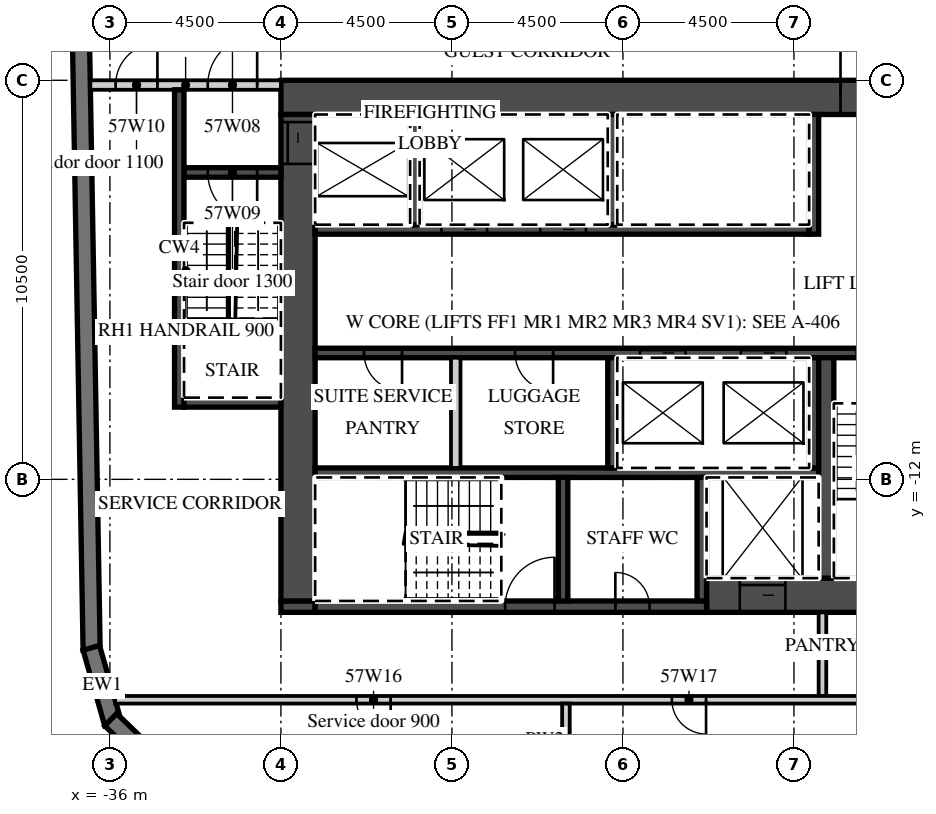
"""IFC4 building model, lengths in metres.
Left out: names, types, materials, properties, quantities, classifications, styles, units other than length and angle.
Written with IfcOpenShell. Run it as: python <this file> out.ifc"""

import sys

from ifc_helpers import new_model, si_unit, direction, frame, frame_2d, origin, place, context, subcontext, project, spatial, polyline, rectangle, outline, extrude, element, fill, save


model = new_model("IFC4")
c1 = context("Model", 3, precision=1e-05, world=origin(), true_north=direction((0.0, 1.0)))
c2 = subcontext(c1, "Body", "Model", "MODEL_VIEW")
j1 = project(units=[si_unit("LENGTHUNIT", "METRE"), si_unit("PLANEANGLEUNIT", "RADIAN")], contexts=[c1])
p1 = place(None, origin())
s1 = spatial("IfcSite", under=j1, at=p1, CompositionType="ELEMENT")
p2 = place(p1, origin())
s2 = spatial("IfcBuilding", under=s1, at=p2, CompositionType="ELEMENT")
p3 = place(p2, frame((0.0, 0.0, 234.2)))
s3 = spatial("IfcBuildingStorey", under=s2, at=p3, CompositionType="ELEMENT", Elevation=234.2)
p4 = place(p3, frame((-37.057, 16.503, 0.0), z_axis=(0.0, 0.0, 1.0), x_axis=(0.017452279857, -0.999847697366, 0.0)))
e1 = element("IfcWall", 1, at=p4, inside=s3, PredefinedType="SOLIDWALL", context=c2, shape_type="SweptSolid", body=[
    extrude(rectangle(XDim=33.0, YDim=0.45, at=frame_2d((16.5, 0.0))), origin(), (0.0, 0.0, 1.0), 3.02),
])
p5 = place(p3, frame((-36.49, -16.434, 0.0), z_axis=(0.0, 0.0, 1.0), x_axis=(0.275577603096, -0.961278827745, 0.0)))
e2 = element("IfcWall", 2, at=p5, inside=s3, PredefinedType="SOLIDWALL", context=c2, shape_type="SweptSolid", body=[
    extrude(outline(polyline([(0.0, -0.225), (2.071, -0.225), (1.95, 0.225), (0.121, 0.225), (0.0, -0.225)])), origin(), (0.0, 0.0, 1.0), 3.02),
])
p6 = place(p3, frame((-35.979, -18.324, 0.0), z_axis=(0.0, 0.0, 1.0), x_axis=(0.719320193998, -0.694678672846, 0.0)))
e3 = element("IfcWall", 3, at=p6, inside=s3, PredefinedType="SOLIDWALL", context=c2, shape_type="SweptSolid", body=[
    extrude(outline(polyline([(0.0, -0.225), (2.071, -0.225), (1.95, 0.225), (0.121, 0.225), (0.0, -0.225)])), origin(), (0.0, 0.0, 1.0), 3.02),
])
p7 = place(p3, frame((-31.5, -1.95, 0.0), z_axis=(0.0, 0.0, 1.0), x_axis=(1.0, 0.0, 0.0)))
e4 = element("IfcWall", 4, at=p7, inside=s3, PredefinedType="SHEAR", context=c2, shape_type="SweptSolid", body=[
    extrude(rectangle(XDim=18.0, YDim=0.9, at=frame_2d((9.0, 0.0))), origin(), (0.0, 0.0, 1.0), 3.02),
])
p8 = place(p7, frame((14.725, 0.0, 0.0)))
e5 = element("IfcOpeningElement", 5, at=p8, cuts=e4, PredefinedType="OPENING", context=c2, shape_type="SweptSolid", body=[
    extrude(rectangle(XDim=1.8, YDim=2.1, at=frame_2d((0.9, 1.05))), frame((0.0, 0.46, 0.0), z_axis=(0.0, -1.0, 0.0), x_axis=(1.0, 0.0, 0.0)), (0.0, 0.0, 1.0), 0.92),
])
p9 = place(p3, frame((-20.3, -15.05, 0.0), z_axis=(0.0, 0.0, 1.0), x_axis=(1.0, 0.0, 0.0)))
e6 = element("IfcWall", 6, at=p9, inside=s3, PredefinedType="SHEAR", context=c2, shape_type="SweptSolid", body=[
    extrude(rectangle(XDim=6.8, YDim=0.9, at=frame_2d((3.4, 0.0))), origin(), (0.0, 0.0, 1.0), 3.02),
])
p10 = place(p9, frame((0.875, 0.0, 0.0)))
e7 = element("IfcOpeningElement", 7, at=p10, cuts=e6, PredefinedType="OPENING", context=c2, shape_type="SweptSolid", body=[
    extrude(rectangle(XDim=1.2, YDim=2.1, at=frame_2d((0.6, 1.05))), frame((0.0, 0.46, 0.0), z_axis=(0.0, -1.0, 0.0), x_axis=(1.0, 0.0, 0.0)), (0.0, 0.0, 1.0), 0.92),
])
p11 = place(p3, frame((-31.5, -15.35, 0.0), z_axis=(0.0, 0.0, 1.0), x_axis=(1.0, 0.0, 0.0)))
e8 = element("IfcWall", 8, at=p11, inside=s3, PredefinedType="SHEAR", context=c2, shape_type="SweptSolid", body=[
    extrude(rectangle(XDim=0.9, YDim=0.3, at=frame_2d((0.45, 0.0))), origin(), (0.0, 0.0, 1.0), 3.02),
])
p12 = place(p3, frame((-30.6, -15.35, 0.0), z_axis=(0.0, 0.0, 1.0), x_axis=(1.0, 0.0, 0.0)))
e9 = element("IfcWall", 9, at=p12, inside=s3, PredefinedType="SHEAR", context=c2, shape_type="SweptSolid", body=[
    extrude(rectangle(XDim=10.3, YDim=0.3, at=frame_2d((5.15, 0.0))), origin(), (0.0, 0.0, 1.0), 3.02),
])
p13 = place(p12, frame((5.0, 0.0, 0.0)))
e10 = element("IfcOpeningElement", 10, at=p13, cuts=e9, PredefinedType="OPENING", context=c2, shape_type="SweptSolid", body=[
    extrude(rectangle(XDim=1.3, YDim=2.1, at=frame_2d((0.65, 1.05))), frame((0.0, 0.16, 0.0), z_axis=(0.0, -1.0, 0.0), x_axis=(1.0, 0.0, 0.0)), (0.0, 0.0, 1.0), 0.32),
])
p14 = place(p12, frame((7.9, 0.0, 0.0)))
e11 = element("IfcOpeningElement", 11, at=p14, cuts=e9, PredefinedType="OPENING", context=c2, shape_type="SweptSolid", body=[
    extrude(rectangle(XDim=0.9, YDim=2.1, at=frame_2d((0.45, 1.05))), frame((0.0, 0.16, 0.0), z_axis=(0.0, -1.0, 0.0), x_axis=(1.0, 0.0, 0.0)), (0.0, 0.0, 1.0), 0.32),
])
p15 = place(p3, frame((-31.05, -15.2, 0.0), z_axis=(0.0, 0.0, 1.0), x_axis=(0.0, 1.0, 0.0)))
e12 = element("IfcWall", 12, at=p15, inside=s3, PredefinedType="SHEAR", context=c2, shape_type="SweptSolid", body=[
    extrude(rectangle(XDim=12.8, YDim=0.9, at=frame_2d((6.4, 0.0))), origin(), (0.0, 0.0, 1.0), 3.02),
])
p16 = place(p15, frame((11.5, 0.0, 0.0)))
e13 = element("IfcOpeningElement", 13, at=p16, cuts=e12, PredefinedType="OPENING", context=c2, shape_type="SweptSolid", body=[
    extrude(rectangle(XDim=1.1, YDim=2.1, at=frame_2d((0.55, 1.05))), frame((0.0, 0.46, 0.0), z_axis=(0.0, -1.0, 0.0), x_axis=(1.0, 0.0, 0.0)), (0.0, 0.0, 1.0), 0.92),
])
p17 = place(p3, frame((-30.6, -5.425, 0.0), z_axis=(0.0, 0.0, 1.0), x_axis=(1.0, 0.0, 0.0)))
e14 = element("IfcWall", 14, at=p17, inside=s3, PredefinedType="SHEAR", context=c2, shape_type="SweptSolid", body=[
    extrude(rectangle(XDim=13.0, YDim=0.25, at=frame_2d((6.5, 0.0))), origin(), (0.0, 0.0, 1.0), 3.02),
])
p18 = place(p17, frame((3.325, 0.0, 0.0)))
e15 = element("IfcOpeningElement", 15, at=p18, cuts=e14, PredefinedType="OPENING", context=c2, shape_type="SweptSolid", body=[
    extrude(rectangle(XDim=1.2, YDim=2.1, at=frame_2d((0.6, 1.05))), frame((0.0, 0.135, 0.0), z_axis=(0.0, -1.0, 0.0), x_axis=(1.0, 0.0, 0.0)), (0.0, 0.0, 1.0), 0.27),
])
p19 = place(p17, frame((5.925, 0.0, 0.0)))
e16 = element("IfcOpeningElement", 16, at=p19, cuts=e14, PredefinedType="OPENING", context=c2, shape_type="SweptSolid", body=[
    extrude(rectangle(XDim=1.2, YDim=2.1, at=frame_2d((0.6, 1.05))), frame((0.0, 0.135, 0.0), z_axis=(0.0, -1.0, 0.0), x_axis=(1.0, 0.0, 0.0)), (0.0, 0.0, 1.0), 0.27),
])
p20 = place(p3, frame((-17.475, -5.55, 0.0), z_axis=(0.0, 0.0, 1.0), x_axis=(0.0, 1.0, 0.0)))
e17 = element("IfcWall", 17, at=p20, inside=s3, PredefinedType="SHEAR", context=c2, shape_type="SweptSolid", body=[
    extrude(rectangle(XDim=3.15, YDim=0.25, at=frame_2d((1.575, 0.0))), origin(), (0.0, 0.0, 1.0), 3.02),
])
for number, where, z_axis, x_axis in (
    (18, (-27.975, -5.3, 0.0), (0.0, 0.0, 1.0), (0.0, 1.0, 0.0)),
    (19, (-22.775, -5.3, 0.0), (0.0, 0.0, 1.0), (0.0, 1.0, 0.0)),
):
    element("IfcWall", number, at=place(p3, frame(where, z_axis=z_axis, x_axis=x_axis)), inside=s3, PredefinedType="SHEAR", context=c2, shape_type="SweptSolid", body=[
        extrude(rectangle(XDim=2.9, YDim=0.25, at=frame_2d((1.45, 0.0))), origin(), (0.0, 0.0, 1.0), 3.02),
    ])
p21 = place(p3, frame((-30.6, -8.675, 0.0), z_axis=(0.0, 0.0, 1.0), x_axis=(1.0, 0.0, 0.0)))
e20 = element("IfcWall", 20, at=p21, inside=s3, PredefinedType="SHEAR", context=c2, shape_type="SweptSolid", body=[
    extrude(rectangle(XDim=16.2, YDim=0.25, at=frame_2d((8.1, 0.0))), origin(), (0.0, 0.0, 1.0), 3.02),
])
p22 = place(p21, frame((8.55, 0.0, 0.0)))
e21 = element("IfcOpeningElement", 21, at=p22, cuts=e20, PredefinedType="OPENING", context=c2, shape_type="SweptSolid", body=[
    extrude(rectangle(XDim=1.2, YDim=2.1, at=frame_2d((0.6, 1.05))), frame((0.0, 0.135, 0.0), z_axis=(0.0, -1.0, 0.0), x_axis=(1.0, 0.0, 0.0)), (0.0, 0.0, 1.0), 0.27),
])
p23 = place(p21, frame((11.2, 0.0, 0.0)))
e22 = element("IfcOpeningElement", 22, at=p23, cuts=e20, PredefinedType="OPENING", context=c2, shape_type="SweptSolid", body=[
    extrude(rectangle(XDim=1.2, YDim=2.1, at=frame_2d((0.6, 1.05))), frame((0.0, 0.135, 0.0), z_axis=(0.0, -1.0, 0.0), x_axis=(1.0, 0.0, 0.0)), (0.0, 0.0, 1.0), 0.27),
])
p24 = place(p21, frame((14.25, 0.0, 0.0)))
e23 = element("IfcOpeningElement", 23, at=p24, cuts=e20, PredefinedType="OPENING", context=c2, shape_type="SweptSolid", body=[
    extrude(rectangle(XDim=1.3, YDim=2.1, at=frame_2d((0.65, 1.05))), frame((0.0, 0.135, 0.0), z_axis=(0.0, -1.0, 0.0), x_axis=(1.0, 0.0, 0.0)), (0.0, 0.0, 1.0), 0.27),
])
p25 = place(p21, frame((1.288, 0.0, 0.0)))
e24 = element("IfcOpeningElement", 24, at=p25, cuts=e20, PredefinedType="OPENING", context=c2, shape_type="SweptSolid", body=[
    extrude(rectangle(XDim=1.0, YDim=2.1, at=frame_2d((0.5, 1.05))), frame((0.0, 0.135, 0.0), z_axis=(0.0, -1.0, 0.0), x_axis=(1.0, 0.0, 0.0)), (0.0, 0.0, 1.0), 0.27),
])
p26 = place(p21, frame((5.262, 0.0, 0.0)))
e25 = element("IfcOpeningElement", 25, at=p26, cuts=e20, PredefinedType="OPENING", context=c2, shape_type="SweptSolid", body=[
    extrude(rectangle(XDim=1.0, YDim=2.1, at=frame_2d((0.5, 1.05))), frame((0.0, 0.135, 0.0), z_axis=(0.0, -1.0, 0.0), x_axis=(1.0, 0.0, 0.0)), (0.0, 0.0, 1.0), 0.27),
])
p27 = place(p3, frame((-30.6, -11.825, 0.0), z_axis=(0.0, 0.0, 1.0), x_axis=(1.0, 0.0, 0.0)))
e26 = element("IfcWall", 26, at=p27, inside=s3, PredefinedType="SHEAR", context=c2, shape_type="SweptSolid", body=[
    extrude(rectangle(XDim=13.25, YDim=0.25, at=frame_2d((6.625, 0.0))), origin(), (0.0, 0.0, 1.0), 3.02),
])
for number, where, z_axis, x_axis in (
    (27, (-17.475, -11.7, 0.0), (0.0, 0.0, 1.0), (0.0, 1.0, 0.0)),
    (28, (-22.775, -11.7, 0.0), (0.0, 0.0, 1.0), (0.0, 1.0, 0.0)),
):
    element("IfcWall", number, at=place(p3, frame(where, z_axis=z_axis, x_axis=x_axis)), inside=s3, PredefinedType="SHEAR", context=c2, shape_type="SweptSolid", body=[
        extrude(rectangle(XDim=2.9, YDim=0.25, at=frame_2d((1.45, 0.0))), origin(), (0.0, 0.0, 1.0), 3.02),
    ])
p28 = place(p3, frame((-26.9, -11.7, 0.0), z_axis=(0.0, 0.0, 1.0), x_axis=(0.0, 1.0, 0.0)))
e29 = element("IfcWall", 29, at=p28, inside=s3, PredefinedType="PARTITIONING", context=c2, shape_type="SweptSolid", body=[
    extrude(rectangle(XDim=2.9, YDim=0.25, at=frame_2d((1.45, 0.0))), origin(), (0.0, 0.0, 1.0), 3.02),
])
p29 = place(p3, frame((-17.15, -14.6, 0.0), z_axis=(0.0, 0.0, 1.0), x_axis=(0.0, 1.0, 0.0)))
e30 = element("IfcWall", 30, at=p29, inside=s3, PredefinedType="SHEAR", context=c2, shape_type="SweptSolid", body=[
    extrude(rectangle(XDim=5.8, YDim=0.4, at=frame_2d((2.9, 0.0))), origin(), (0.0, 0.0, 1.0), 3.02),
])
for number, where, z_axis, x_axis in (
    (31, (-20.425, -15.2, 0.0), (0.0, 0.0, 1.0), (0.0, 1.0, 0.0)),
    (32, (-24.075, -15.2, 0.0), (0.0, 0.0, 1.0), (0.0, 1.0, 0.0)),
):
    element("IfcWall", number, at=place(p3, frame(where, z_axis=z_axis, x_axis=x_axis)), inside=s3, PredefinedType="SHEAR", context=c2, shape_type="SweptSolid", body=[
        extrude(rectangle(XDim=3.25, YDim=0.25, at=frame_2d((1.625, 0.0))), origin(), (0.0, 0.0, 1.0), 3.02),
    ])
p30 = place(p3, frame((-36.515, -1.625, 0.0), z_axis=(0.0, 0.0, 1.0), x_axis=(1.0, 0.0, 0.0)))
e33 = element("IfcWall", 33, at=p30, inside=s3, PredefinedType="PARTITIONING", context=c2, shape_type="SweptSolid", body=[
    extrude(rectangle(XDim=5.015, YDim=0.25, at=frame_2d((2.508, 0.0))), origin(), (0.0, 0.0, 1.0), 3.02),
])
p31 = place(p30, frame((3.09, 0.0, 0.0)))
e34 = element("IfcOpeningElement", 34, at=p31, cuts=e33, PredefinedType="OPENING", context=c2, shape_type="SweptSolid", body=[
    extrude(rectangle(XDim=1.3, YDim=2.1, at=frame_2d((0.65, 1.05))), frame((0.0, 0.135, 0.0), z_axis=(0.0, -1.0, 0.0), x_axis=(1.0, 0.0, 0.0)), (0.0, 0.0, 1.0), 0.27),
])
p32 = place(p30, frame((0.665, 0.0, 0.0)))
e35 = element("IfcOpeningElement", 35, at=p32, cuts=e33, PredefinedType="OPENING", context=c2, shape_type="SweptSolid", body=[
    extrude(rectangle(XDim=1.1, YDim=2.1, at=frame_2d((0.55, 1.05))), frame((0.0, 0.135, 0.0), z_axis=(0.0, -1.0, 0.0), x_axis=(1.0, 0.0, 0.0)), (0.0, 0.0, 1.0), 0.27),
])
p33 = place(p3, frame((-34.05, -3.925, 0.0), z_axis=(0.0, 0.0, 1.0), x_axis=(1.0, 0.0, 0.0)))
e36 = element("IfcWall", 36, at=p33, inside=s3, PredefinedType="SHEAR", context=c2, shape_type="SweptSolid", body=[
    extrude(rectangle(XDim=2.55, YDim=0.25, at=frame_2d((1.275, 0.0))), origin(), (0.0, 0.0, 1.0), 3.02),
])
p34 = place(p33, frame((0.625, 0.0, 0.0)))
e37 = element("IfcOpeningElement", 37, at=p34, cuts=e36, PredefinedType="OPENING", context=c2, shape_type="SweptSolid", body=[
    extrude(rectangle(XDim=1.3, YDim=2.1, at=frame_2d((0.65, 1.05))), frame((0.0, 0.135, 0.0), z_axis=(0.0, -1.0, 0.0), x_axis=(1.0, 0.0, 0.0)), (0.0, 0.0, 1.0), 0.27),
])
p35 = place(p3, frame((-34.175, -10.1, 0.0), z_axis=(0.0, 0.0, 1.0), x_axis=(0.0, 1.0, 0.0)))
e38 = element("IfcWall", 38, at=p35, inside=s3, PredefinedType="SHEAR", context=c2, shape_type="SweptSolid", body=[
    extrude(rectangle(XDim=8.35, YDim=0.25, at=frame_2d((4.175, 0.0))), origin(), (0.0, 0.0, 1.0), 3.02),
])
p36 = place(p3, frame((-34.05, -9.975, 0.0), z_axis=(0.0, 0.0, 1.0), x_axis=(1.0, 0.0, 0.0)))
e39 = element("IfcWall", 39, at=p36, inside=s3, PredefinedType="SHEAR", context=c2, shape_type="SweptSolid", body=[
    extrude(rectangle(XDim=2.55, YDim=0.25, at=frame_2d((1.275, 0.0))), origin(), (0.0, 0.0, 1.0), 3.02),
])
p37 = place(p3, frame((-17.25, -17.7, 0.0), z_axis=(0.0, 0.0, 1.0), x_axis=(0.0, 1.0, 0.0)))
e40 = element("IfcWall", 40, at=p37, inside=s3, PredefinedType="PARTITIONING", context=c2, shape_type="SweptSolid", body=[
    extrude(rectangle(XDim=2.2, YDim=0.2, at=frame_2d((1.1, 0.0))), origin(), (0.0, 0.0, 1.0), 3.02),
])
p38 = place(p3, frame((-35.864, -17.8, 0.0), z_axis=(0.0, 0.0, 1.0), x_axis=(1.0, 0.0, 0.0)))
e41 = element("IfcWall", 41, at=p38, inside=s3, PredefinedType="PARTITIONING", context=c2, shape_type="SweptSolid", body=[
    extrude(rectangle(XDim=22.264, YDim=0.2, at=frame_2d((11.132, 0.0))), origin(), (0.0, 0.0, 1.0), 3.02),
])
p39 = place(p38, frame((6.351, 0.0, 0.0)))
e42 = element("IfcOpeningElement", 42, at=p39, cuts=e41, PredefinedType="OPENING", context=c2, shape_type="SweptSolid", body=[
    extrude(rectangle(XDim=0.9, YDim=2.1, at=frame_2d((0.45, 1.05))), frame((0.0, 0.11, 0.0), z_axis=(0.0, -1.0, 0.0), x_axis=(1.0, 0.0, 0.0)), (0.0, 0.0, 1.0), 0.22),
])
p40 = place(p38, frame((14.651, 0.0, 0.0)))
e43 = element("IfcOpeningElement", 43, at=p40, cuts=e41, PredefinedType="OPENING", context=c2, shape_type="SweptSolid", body=[
    extrude(rectangle(XDim=0.9, YDim=2.1, at=frame_2d((0.45, 1.05))), frame((0.0, 0.11, 0.0), z_axis=(0.0, -1.0, 0.0), x_axis=(1.0, 0.0, 0.0)), (0.0, 0.0, 1.0), 0.22),
])
p41 = place(p3, frame((-24.0, -19.824, 0.0), z_axis=(0.0, 0.0, 1.0), x_axis=(0.0, 1.0, 0.0)))
e44 = element("IfcWall", 44, at=p41, inside=s3, PredefinedType="PARTITIONING", context=c2, shape_type="SweptSolid", body=[
    extrude(rectangle(XDim=1.925, YDim=0.2, at=frame_2d((0.962, 0.0))), origin(), (0.0, 0.0, 1.0), 3.02),
])
p42 = place(p22, origin())
e45 = element("IfcDoor", 45, at=p42, inside=s3, OperationType="SLIDING_TO_LEFT", PredefinedType="DOOR", context=c2, shape_type="SweptSolid", body=[
    extrude(rectangle(XDim=1.2, YDim=2.1, at=frame_2d((0.6, 1.05))), frame((0.0, 0.025, 0.0), z_axis=(0.0, -1.0, 0.0), x_axis=(1.0, 0.0, 0.0)), (0.0, 0.0, 1.0), 0.05),
])
fill(e21, e45)
p43 = place(p23, origin())
e46 = element("IfcDoor", 46, at=p43, inside=s3, OperationType="SLIDING_TO_RIGHT", PredefinedType="DOOR", context=c2, shape_type="SweptSolid", body=[
    extrude(rectangle(XDim=1.2, YDim=2.1, at=frame_2d((0.6, 1.05))), frame((0.0, 0.025, 0.0), z_axis=(0.0, -1.0, 0.0), x_axis=(1.0, 0.0, 0.0)), (0.0, 0.0, 1.0), 0.05),
])
fill(e22, e46)
p44 = place(p18, origin())
e47 = element("IfcDoor", 47, at=p44, inside=s3, OperationType="SLIDING_TO_RIGHT", PredefinedType="DOOR", context=c2, shape_type="SweptSolid", body=[
    extrude(rectangle(XDim=1.2, YDim=2.1, at=frame_2d((0.6, 1.05))), frame((0.0, 0.025, 0.0), z_axis=(0.0, -1.0, 0.0), x_axis=(1.0, 0.0, 0.0)), (0.0, 0.0, 1.0), 0.05),
])
fill(e15, e47)
p45 = place(p19, origin())
e48 = element("IfcDoor", 48, at=p45, inside=s3, OperationType="SLIDING_TO_RIGHT", PredefinedType="DOOR", context=c2, shape_type="SweptSolid", body=[
    extrude(rectangle(XDim=1.2, YDim=2.1, at=frame_2d((0.6, 1.05))), frame((0.0, 0.025, 0.0), z_axis=(0.0, -1.0, 0.0), x_axis=(1.0, 0.0, 0.0)), (0.0, 0.0, 1.0), 0.05),
])
fill(e16, e48)
p46 = place(p10, origin())
e49 = element("IfcDoor", 49, at=p46, inside=s3, OperationType="SLIDING_TO_LEFT", PredefinedType="DOOR", context=c2, shape_type="SweptSolid", body=[
    extrude(rectangle(XDim=1.2, YDim=2.1, at=frame_2d((0.6, 1.05))), frame((0.0, 0.025, 0.0), z_axis=(0.0, -1.0, 0.0), x_axis=(1.0, 0.0, 0.0)), (0.0, 0.0, 1.0), 0.05),
])
fill(e7, e49)
p47 = place(p16, origin())
e50 = element("IfcDoor", 50, at=p47, inside=s3, OperationType="SLIDING_TO_RIGHT", PredefinedType="DOOR", context=c2, shape_type="SweptSolid", body=[
    extrude(rectangle(XDim=1.1, YDim=2.1, at=frame_2d((0.55, 1.05))), frame((0.0, 0.025, 0.0), z_axis=(0.0, -1.0, 0.0), x_axis=(1.0, 0.0, 0.0)), (0.0, 0.0, 1.0), 0.05),
])
fill(e13, e50)
p48 = place(p8, origin())
e51 = element("IfcDoor", 51, at=p48, inside=s3, OperationType="DOUBLE_DOOR_DOUBLE_SWING", PredefinedType="DOOR", context=c2, shape_type="SweptSolid", body=[
    extrude(rectangle(XDim=1.8, YDim=2.1, at=frame_2d((0.9, 1.05))), frame((0.0, 0.025, 0.0), z_axis=(0.0, -1.0, 0.0), x_axis=(1.0, 0.0, 0.0)), (0.0, 0.0, 1.0), 0.05),
])
fill(e5, e51)
p49 = place(p31, origin())
e52 = element("IfcDoor", 52, at=p49, inside=s3, OperationType="SINGLE_SWING_RIGHT", PredefinedType="DOOR", context=c2, shape_type="SweptSolid", body=[
    extrude(rectangle(XDim=1.3, YDim=2.1, at=frame_2d((0.65, 1.05))), frame((0.0, 0.025, 0.0), z_axis=(0.0, -1.0, 0.0), x_axis=(1.0, 0.0, 0.0)), (0.0, 0.0, 1.0), 0.05),
])
fill(e34, e52)
p50 = place(p34, origin())
e53 = element("IfcDoor", 53, at=p50, inside=s3, OperationType="SINGLE_SWING_RIGHT", PredefinedType="DOOR", context=c2, shape_type="SweptSolid", body=[
    extrude(rectangle(XDim=1.3, YDim=2.1, at=frame_2d((0.65, 1.05))), frame((0.0, 0.025, 0.0), z_axis=(0.0, -1.0, 0.0), x_axis=(1.0, 0.0, 0.0)), (0.0, 0.0, 1.0), 0.05),
])
fill(e37, e53)
p51 = place(p32, origin())
e54 = element("IfcDoor", 54, at=p51, inside=s3, OperationType="SINGLE_SWING_RIGHT", PredefinedType="DOOR", context=c2, shape_type="SweptSolid", body=[
    extrude(rectangle(XDim=1.1, YDim=2.1, at=frame_2d((0.55, 1.05))), frame((0.0, 0.025, 0.0), z_axis=(0.0, -1.0, 0.0), x_axis=(1.0, 0.0, 0.0)), (0.0, 0.0, 1.0), 0.05),
])
fill(e35, e54)
p52 = place(p24, origin())
e55 = element("IfcDoor", 55, at=p52, inside=s3, OperationType="SINGLE_SWING_RIGHT", PredefinedType="DOOR", context=c2, shape_type="SweptSolid", body=[
    extrude(rectangle(XDim=1.3, YDim=2.1, at=frame_2d((0.65, 1.05))), frame((0.0, 0.025, 0.0), z_axis=(0.0, -1.0, 0.0), x_axis=(1.0, 0.0, 0.0)), (0.0, 0.0, 1.0), 0.05),
])
fill(e23, e55)
p53 = place(p13, origin())
e56 = element("IfcDoor", 56, at=p53, inside=s3, OperationType="SINGLE_SWING_RIGHT", PredefinedType="DOOR", context=c2, shape_type="SweptSolid", body=[
    extrude(rectangle(XDim=1.3, YDim=2.1, at=frame_2d((0.65, 1.05))), frame((0.0, 0.025, 0.0), z_axis=(0.0, -1.0, 0.0), x_axis=(1.0, 0.0, 0.0)), (0.0, 0.0, 1.0), 0.05),
])
fill(e10, e56)
p54 = place(p14, origin())
e57 = element("IfcDoor", 57, at=p54, inside=s3, OperationType="SINGLE_SWING_LEFT", PredefinedType="DOOR", context=c2, shape_type="SweptSolid", body=[
    extrude(rectangle(XDim=0.9, YDim=2.1, at=frame_2d((0.45, 1.05))), frame((0.0, 0.025, 0.0), z_axis=(0.0, -1.0, 0.0), x_axis=(1.0, 0.0, 0.0)), (0.0, 0.0, 1.0), 0.05),
])
fill(e11, e57)
p55 = place(p25, origin())
e58 = element("IfcDoor", 58, at=p55, inside=s3, OperationType="SINGLE_SWING_RIGHT", PredefinedType="DOOR", context=c2, shape_type="SweptSolid", body=[
    extrude(rectangle(XDim=1.0, YDim=2.1, at=frame_2d((0.5, 1.05))), frame((0.0, 0.025, 0.0), z_axis=(0.0, -1.0, 0.0), x_axis=(1.0, 0.0, 0.0)), (0.0, 0.0, 1.0), 0.05),
])
fill(e24, e58)
p56 = place(p26, origin())
e59 = element("IfcDoor", 59, at=p56, inside=s3, OperationType="SINGLE_SWING_RIGHT", PredefinedType="DOOR", context=c2, shape_type="SweptSolid", body=[
    extrude(rectangle(XDim=1.0, YDim=2.1, at=frame_2d((0.5, 1.05))), frame((0.0, 0.025, 0.0), z_axis=(0.0, -1.0, 0.0), x_axis=(1.0, 0.0, 0.0)), (0.0, 0.0, 1.0), 0.05),
])
fill(e25, e59)
p57 = place(p39, origin())
e60 = element("IfcDoor", 60, at=p57, inside=s3, OperationType="SINGLE_SWING_RIGHT", PredefinedType="DOOR", context=c2, shape_type="SweptSolid", body=[
    extrude(rectangle(XDim=0.9, YDim=2.1, at=frame_2d((0.45, 1.05))), frame((0.0, 0.025, 0.0), z_axis=(0.0, -1.0, 0.0), x_axis=(1.0, 0.0, 0.0)), (0.0, 0.0, 1.0), 0.05),
])
fill(e42, e60)
p58 = place(p40, origin())
e61 = element("IfcDoor", 61, at=p58, inside=s3, OperationType="SINGLE_SWING_RIGHT", PredefinedType="DOOR", context=c2, shape_type="SweptSolid", body=[
    extrude(rectangle(XDim=0.9, YDim=2.1, at=frame_2d((0.45, 1.05))), frame((0.0, 0.025, 0.0), z_axis=(0.0, -1.0, 0.0), x_axis=(1.0, 0.0, 0.0)), (0.0, 0.0, 1.0), 0.05),
])
fill(e43, e61)
save(model, sys.argv[1])
